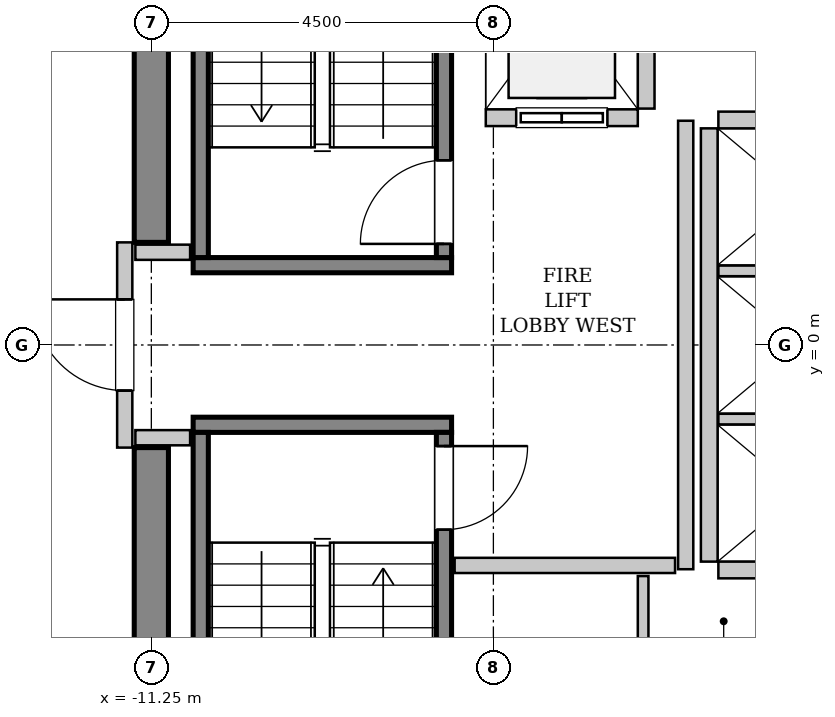
"""IFC4 building model, lengths in metres.
Left out: names, types, materials, properties, quantities, classifications, styles, units other than length and angle.
Written with IfcOpenShell. Run it as: python <this file> out.ifc"""

import sys

from ifc_helpers import new_model, si_unit, direction, frame, frame_2d, origin, place, context, subcontext, project, spatial, rectangle, extrude, source, transform, mapped, element, fill, save


model = new_model("IFC4")
c1 = context("Model", 3, precision=1e-05, world=origin(), true_north=direction((0.0, 1.0)))
c2 = subcontext(c1, "Body", "Model", "MODEL_VIEW")
j1 = project(units=[si_unit("LENGTHUNIT", "METRE"), si_unit("PLANEANGLEUNIT", "RADIAN")], contexts=[c1])
p1 = place(None, origin())
s1 = spatial("IfcSite", under=j1, at=p1, CompositionType="ELEMENT")
p2 = place(p1, origin())
s2 = spatial("IfcBuilding", under=s1, at=p2, CompositionType="ELEMENT")
p3 = place(p2, frame((0.0, 0.0, 214.2)))
s3 = spatial("IfcBuildingStorey", under=s2, at=p3, CompositionType="ELEMENT", Elevation=214.2)
m1 = source(origin(), c2, "Body", "SweptSolid", [
    extrude(rectangle(XDim=7.425, YDim=0.45, at=frame_2d((3.712, 0.0))), origin(), (0.0, 0.0, 1.0), 3.8),
])
for number, where, z_axis, x_axis in (
    (1, (-11.25, -8.775, 0.0), (0.0, 0.0, 1.0), (0.0, 1.0, 0.0)),
    (2, (-11.25, 1.35, 0.0), (0.0, 0.0, 1.0), (0.0, 1.0, 0.0)),
):
    element("IfcWall", number, at=place(p3, frame(where, z_axis=z_axis, x_axis=x_axis)), inside=s3, PredefinedType="SHEAR", context=c2, shape_type="MappedRepresentation", body=[
        mapped(m1, transform((0.0, 0.0, 0.0), x_axis=(1.0, 0.0, 0.0), y_axis=(0.0, 1.0, 0.0), z_axis=(0.0, 0.0, 1.0), scale=1.0)),
    ])
m2 = source(origin(), c2, "Body", "SweptSolid", [
    extrude(rectangle(XDim=3.4, YDim=0.2, at=frame_2d((1.7, 0.0))), origin(), (0.0, 0.0, 1.0), 3.8),
])
p4 = place(p3, frame((-7.3, 1.05, 0.0), z_axis=(0.0, 0.0, 1.0), x_axis=(-1.0, 0.0, 0.0)))
e3 = element("IfcWall", 3, at=p4, inside=s3, PredefinedType="SOLIDWALL", context=c2, shape_type="MappedRepresentation", body=[
    mapped(m2, transform((0.0, 0.0, 0.0), x_axis=(1.0, 0.0, 0.0), y_axis=(0.0, 1.0, 0.0), z_axis=(0.0, 0.0, 1.0), scale=1.0)),
])
m3 = source(origin(), c2, "Body", "SweptSolid", [
    extrude(rectangle(XDim=7.1, YDim=0.2, at=frame_2d((3.55, 0.0))), origin(), (0.0, 0.0, 1.0), 3.8),
])
p5 = place(p3, frame((-7.4, 1.15, 0.0), z_axis=(0.0, 0.0, 1.0), x_axis=(0.0, 1.0, 0.0)))
e4 = element("IfcWall", 4, at=p5, inside=s3, PredefinedType="SOLIDWALL", context=c2, shape_type="MappedRepresentation", body=[
    mapped(m3, transform((0.0, 0.0, 0.0), x_axis=(1.0, 0.0, 0.0), y_axis=(0.0, 1.0, 0.0), z_axis=(0.0, 0.0, 1.0), scale=1.0)),
])
p6 = place(p5, frame((0.18, 0.0, 0.0)))
e5 = element("IfcOpeningElement", 5, at=p6, cuts=e4, PredefinedType="OPENING", context=c2, shape_type="SweptSolid", body=[
    extrude(rectangle(XDim=1.1, YDim=2.15, at=frame_2d((0.55, 1.075))), frame((0.0, 0.11, 0.0), z_axis=(0.0, -1.0, 0.0), x_axis=(1.0, 0.0, 0.0)), (0.0, 0.0, 1.0), 0.22),
])
p7 = place(p3, frame((-10.6, 1.15, 0.0), z_axis=(0.0, 0.0, 1.0), x_axis=(0.0, 1.0, 0.0)))
e6 = element("IfcWall", 6, at=p7, inside=s3, PredefinedType="SOLIDWALL", context=c2, shape_type="MappedRepresentation", body=[
    mapped(m3, transform((0.0, 0.0, 0.0), x_axis=(1.0, 0.0, 0.0), y_axis=(0.0, 1.0, 0.0), z_axis=(0.0, 0.0, 1.0), scale=1.0)),
])
p8 = place(p3, frame((-10.7, -1.05, 0.0), z_axis=(0.0, 0.0, 1.0), x_axis=(1.0, 0.0, 0.0)))
e7 = element("IfcWall", 7, at=p8, inside=s3, PredefinedType="SOLIDWALL", context=c2, shape_type="MappedRepresentation", body=[
    mapped(m2, transform((0.0, 0.0, 0.0), x_axis=(1.0, 0.0, 0.0), y_axis=(0.0, 1.0, 0.0), z_axis=(0.0, 0.0, 1.0), scale=1.0)),
])
p9 = place(p3, frame((-10.6, -1.15, 0.0), z_axis=(0.0, 0.0, 1.0), x_axis=(0.0, -1.0, 0.0)))
e8 = element("IfcWall", 8, at=p9, inside=s3, PredefinedType="SOLIDWALL", context=c2, shape_type="MappedRepresentation", body=[
    mapped(m3, transform((0.0, 0.0, 0.0), x_axis=(1.0, 0.0, 0.0), y_axis=(0.0, 1.0, 0.0), z_axis=(0.0, 0.0, 1.0), scale=1.0)),
])
p10 = place(p3, frame((-7.4, -1.15, 0.0), z_axis=(0.0, 0.0, 1.0), x_axis=(0.0, -1.0, 0.0)))
e9 = element("IfcWall", 9, at=p10, inside=s3, PredefinedType="SOLIDWALL", context=c2, shape_type="MappedRepresentation", body=[
    mapped(m3, transform((0.0, 0.0, 0.0), x_axis=(1.0, 0.0, 0.0), y_axis=(0.0, 1.0, 0.0), z_axis=(0.0, 0.0, 1.0), scale=1.0)),
])
p11 = place(p10, frame((0.18, 0.0, 0.0)))
e10 = element("IfcOpeningElement", 10, at=p11, cuts=e9, PredefinedType="OPENING", context=c2, shape_type="SweptSolid", body=[
    extrude(rectangle(XDim=1.1, YDim=2.15, at=frame_2d((0.55, 1.075))), frame((0.0, 0.11, 0.0), z_axis=(0.0, -1.0, 0.0), x_axis=(1.0, 0.0, 0.0)), (0.0, 0.0, 1.0), 0.22),
])
m4 = source(origin(), c2, "Body", "SweptSolid", [
    extrude(rectangle(XDim=2.0, YDim=0.22, at=frame_2d((1.0, 0.0))), origin(), (0.0, 0.0, 1.0), 3.535),
])
p12 = place(p3, frame((-6.85, 2.99, 0.0), z_axis=(0.0, 0.0, 1.0), x_axis=(1.0, 0.0, 0.0)))
e11 = element("IfcWall", 11, at=p12, inside=s3, PredefinedType="SOLIDWALL", context=c2, shape_type="MappedRepresentation", body=[
    mapped(m4, transform((0.0, 0.0, 0.0), x_axis=(1.0, 0.0, 0.0), y_axis=(0.0, 1.0, 0.0), z_axis=(0.0, 0.0, 1.0), scale=1.0)),
])
p13 = place(p12, frame((0.4, 0.0, 0.0)))
e12 = element("IfcOpeningElement", 12, at=p13, cuts=e11, PredefinedType="OPENING", context=c2, shape_type="SweptSolid", body=[
    extrude(rectangle(XDim=1.2, YDim=2.2, at=frame_2d((0.6, 1.1))), frame((0.0, 0.12, 0.0), z_axis=(0.0, -1.0, 0.0), x_axis=(1.0, 0.0, 0.0)), (0.0, 0.0, 1.0), 0.24),
])
m5 = source(origin(), c2, "Body", "SweptSolid", [
    extrude(rectangle(XDim=2.68, YDim=0.22, at=frame_2d((1.34, 0.0))), origin(), (0.0, 0.0, 1.0), 3.535),
])
p14 = place(p3, frame((-4.74, 3.11, 0.0), z_axis=(0.0, 0.0, 1.0), x_axis=(0.0, 1.0, 0.0)))
e13 = element("IfcWall", 13, at=p14, inside=s3, PredefinedType="SOLIDWALL", context=c2, shape_type="MappedRepresentation", body=[
    mapped(m5, transform((0.0, 0.0, 0.0), x_axis=(1.0, 0.0, 0.0), y_axis=(0.0, 1.0, 0.0), z_axis=(0.0, 0.0, 1.0), scale=1.0)),
])
m6 = source(origin(), c2, "Body", "SweptSolid", [
    extrude(rectangle(XDim=5.7, YDim=0.22, at=frame_2d((2.85, 0.0))), origin(), (0.0, 0.0, 1.0), 3.535),
])
p15 = place(p3, frame((-3.91, 2.85, 0.0), z_axis=(0.0, 0.0, 1.0), x_axis=(0.0, -1.0, 0.0)))
e14 = element("IfcWall", 14, at=p15, inside=s3, PredefinedType="SOLIDWALL", context=c2, shape_type="MappedRepresentation", body=[
    mapped(m6, transform((0.0, 0.0, 0.0), x_axis=(1.0, 0.0, 0.0), y_axis=(0.0, 1.0, 0.0), z_axis=(0.0, 0.0, 1.0), scale=1.0)),
])
m7 = source(origin(), c2, "Body", "SweptSolid", [
    extrude(rectangle(XDim=2.13, YDim=0.22, at=frame_2d((1.065, 0.0))), origin(), (0.0, 0.0, 1.0), 3.535),
])
p16 = place(p3, frame((-3.79, -2.96, 0.0), z_axis=(0.0, 0.0, 1.0), x_axis=(1.0, 0.0, 0.0)))
e15 = element("IfcWall", 15, at=p16, inside=s3, PredefinedType="SOLIDWALL", context=c2, shape_type="MappedRepresentation", body=[
    mapped(m7, transform((0.0, 0.0, 0.0), x_axis=(1.0, 0.0, 0.0), y_axis=(0.0, 1.0, 0.0), z_axis=(0.0, 0.0, 1.0), scale=1.0)),
])
m8 = source(origin(), c2, "Body", "SweptSolid", [
    extrude(rectangle(XDim=2.13, YDim=0.14, at=frame_2d((1.065, 0.0))), origin(), (0.0, 0.0, 1.0), 3.535),
])
for number, where, z_axis, x_axis in (
    (16, (-3.79, -0.975, 0.0), (0.0, 0.0, 1.0), (1.0, 0.0, 0.0)),
    (17, (-3.79, 0.975, 0.0), (0.0, 0.0, 1.0), (1.0, 0.0, 0.0)),
):
    element("IfcWall", number, at=place(p3, frame(where, z_axis=z_axis, x_axis=x_axis)), inside=s3, PredefinedType="PARTITIONING", context=c2, shape_type="MappedRepresentation", body=[
        mapped(m8, transform((0.0, 0.0, 0.0), x_axis=(1.0, 0.0, 0.0), y_axis=(0.0, 1.0, 0.0), z_axis=(0.0, 0.0, 1.0), scale=1.0)),
    ])
p17 = place(p3, frame((-1.66, 2.96, 0.0), z_axis=(0.0, 0.0, 1.0), x_axis=(-1.0, 0.0, 0.0)))
e18 = element("IfcWall", 18, at=p17, inside=s3, PredefinedType="SOLIDWALL", context=c2, shape_type="MappedRepresentation", body=[
    mapped(m7, transform((0.0, 0.0, 0.0), x_axis=(1.0, 0.0, 0.0), y_axis=(0.0, 1.0, 0.0), z_axis=(0.0, 0.0, 1.0), scale=1.0)),
])
m9 = source(origin(), c2, "Body", "SweptSolid", [
    extrude(rectangle(XDim=2.7, YDim=0.2, at=frame_2d((1.35, 0.0))), origin(), (0.0, 0.0, 1.0), 2.625),
])
p18 = place(p3, frame((-11.6, -1.35, 0.0), z_axis=(0.0, 0.0, 1.0), x_axis=(0.0, 1.0, 0.0)))
e19 = element("IfcWall", 19, at=p18, inside=s3, PredefinedType="PARTITIONING", context=c2, shape_type="MappedRepresentation", body=[
    mapped(m9, transform((0.0, 0.0, 0.0), x_axis=(1.0, 0.0, 0.0), y_axis=(0.0, 1.0, 0.0), z_axis=(0.0, 0.0, 1.0), scale=1.0)),
])
p19 = place(p18, frame((0.75, 0.0, 0.0)))
e20 = element("IfcOpeningElement", 20, at=p19, cuts=e19, PredefinedType="OPENING", context=c2, shape_type="SweptSolid", body=[
    extrude(rectangle(XDim=1.2, YDim=2.15, at=frame_2d((0.6, 1.075))), frame((0.0, 0.11, 0.0), z_axis=(0.0, -1.0, 0.0), x_axis=(1.0, 0.0, 0.0)), (0.0, 0.0, 1.0), 0.22),
])
m10 = source(origin(), c2, "Body", "SweptSolid", [
    extrude(rectangle(XDim=5.9, YDim=0.2, at=frame_2d((2.95, 0.0))), origin(), (0.0, 0.0, 1.0), 3.535),
])
p20 = place(p3, frame((-4.22, -2.95, 0.0), z_axis=(0.0, 0.0, 1.0), x_axis=(0.0, 1.0, 0.0)))
e21 = element("IfcWall", 21, at=p20, inside=s3, PredefinedType="PARTITIONING", context=c2, shape_type="MappedRepresentation", body=[
    mapped(m10, transform((0.0, 0.0, 0.0), x_axis=(1.0, 0.0, 0.0), y_axis=(0.0, 1.0, 0.0), z_axis=(0.0, 0.0, 1.0), scale=1.0)),
])
m11 = source(origin(), c2, "Body", "SweptSolid", [
    extrude(rectangle(XDim=2.9, YDim=0.2, at=frame_2d((1.45, 0.0))), origin(), (0.0, 0.0, 1.0), 3.535),
])
p21 = place(p3, frame((-7.26, -2.9, 0.0), z_axis=(0.0, 0.0, 1.0), x_axis=(1.0, 0.0, 0.0)))
e22 = element("IfcWall", 22, at=p21, inside=s3, PredefinedType="PARTITIONING", context=c2, shape_type="MappedRepresentation", body=[
    mapped(m11, transform((0.0, 0.0, 0.0), x_axis=(1.0, 0.0, 0.0), y_axis=(0.0, 1.0, 0.0), z_axis=(0.0, 0.0, 1.0), scale=1.0)),
])
m12 = source(origin(), c2, "Body", "SweptSolid", [
    extrude(rectangle(XDim=0.72, YDim=0.2, at=frame_2d((0.36, 0.0))), origin(), (0.0, 0.0, 1.0), 3.535),
])
for number, where, z_axis, x_axis in (
    (23, (-11.46, 1.22, 0.0), (0.0, 0.0, 1.0), (1.0, 0.0, 0.0)),
    (24, (-11.46, -1.22, 0.0), (0.0, 0.0, 1.0), (1.0, 0.0, 0.0)),
):
    element("IfcWall", number, at=place(p3, frame(where, z_axis=z_axis, x_axis=x_axis)), inside=s3, PredefinedType="PARTITIONING", context=c2, shape_type="MappedRepresentation", body=[
        mapped(m12, transform((0.0, 0.0, 0.0), x_axis=(1.0, 0.0, 0.0), y_axis=(0.0, 1.0, 0.0), z_axis=(0.0, 0.0, 1.0), scale=1.0)),
    ])
m13 = source(origin(), c2, "Body", "SweptSolid", [
    extrude(rectangle(XDim=1.1, YDim=0.14, at=frame_2d((0.55, 0.0))), origin(), (0.0, 0.0, 1.0), 3.535),
])
p22 = place(p3, frame((-4.78, -4.14, 0.0), z_axis=(0.0, 0.0, 1.0), x_axis=(0.0, 1.0, 0.0)))
e25 = element("IfcWall", 25, at=p22, inside=s3, PredefinedType="PARTITIONING", context=c2, shape_type="MappedRepresentation", body=[
    mapped(m13, transform((0.0, 0.0, 0.0), x_axis=(1.0, 0.0, 0.0), y_axis=(0.0, 1.0, 0.0), z_axis=(0.0, 0.0, 1.0), scale=1.0)),
])
m14 = source(origin(), c2, "Body", "SweptSolid", [
    extrude(rectangle(XDim=1.1, YDim=2.15, at=frame_2d((0.55, 1.075))), frame((0.0, 0.025, 0.0), z_axis=(0.0, -1.0, 0.0), x_axis=(1.0, 0.0, 0.0)), (0.0, 0.0, 1.0), 0.05),
])
p23 = place(p6, origin())
e26 = element("IfcDoor", 26, at=p23, inside=s3, OperationType="SINGLE_SWING_LEFT", PredefinedType="DOOR", context=c2, shape_type="MappedRepresentation", body=[
    mapped(m14, transform((0.0, 0.0, 0.0), x_axis=(1.0, 0.0, 0.0), y_axis=(0.0, 1.0, 0.0), z_axis=(0.0, 0.0, 1.0), scale=1.0)),
])
fill(e5, e26)
p24 = place(p11, origin())
e27 = element("IfcDoor", 27, at=p24, inside=s3, OperationType="SINGLE_SWING_LEFT", PredefinedType="DOOR", context=c2, shape_type="MappedRepresentation", body=[
    mapped(m14, transform((0.0, 0.0, 0.0), x_axis=(1.0, 0.0, 0.0), y_axis=(0.0, 1.0, 0.0), z_axis=(0.0, 0.0, 1.0), scale=1.0)),
])
fill(e10, e27)
m15 = source(origin(), c2, "Body", "SweptSolid", [
    extrude(rectangle(XDim=1.2, YDim=2.2, at=frame_2d((0.6, 1.1))), frame((0.0, 0.025, 0.0), z_axis=(0.0, -1.0, 0.0), x_axis=(1.0, 0.0, 0.0)), (0.0, 0.0, 1.0), 0.05),
])
p25 = place(p13, origin())
e28 = element("IfcDoor", 28, at=p25, inside=s3, OperationType="SLIDING_TO_LEFT", PredefinedType="DOOR", context=c2, shape_type="MappedRepresentation", body=[
    mapped(m15, transform((0.0, 0.0, 0.0), x_axis=(1.0, 0.0, 0.0), y_axis=(0.0, 1.0, 0.0), z_axis=(0.0, 0.0, 1.0), scale=1.0)),
])
fill(e12, e28)
m16 = source(origin(), c2, "Body", "SweptSolid", [
    extrude(rectangle(XDim=1.2, YDim=2.15, at=frame_2d((0.6, 1.075))), frame((0.0, 0.025, 0.0), z_axis=(0.0, -1.0, 0.0), x_axis=(1.0, 0.0, 0.0)), (0.0, 0.0, 1.0), 0.05),
])
p26 = place(p19, origin())
e29 = element("IfcDoor", 29, at=p26, inside=s3, OperationType="SINGLE_SWING_RIGHT", PredefinedType="DOOR", context=c2, shape_type="MappedRepresentation", body=[
    mapped(m16, transform((0.0, 0.0, 0.0), x_axis=(1.0, 0.0, 0.0), y_axis=(0.0, 1.0, 0.0), z_axis=(0.0, 0.0, 1.0), scale=1.0)),
])
fill(e20, e29)
save(model, sys.argv[1])
